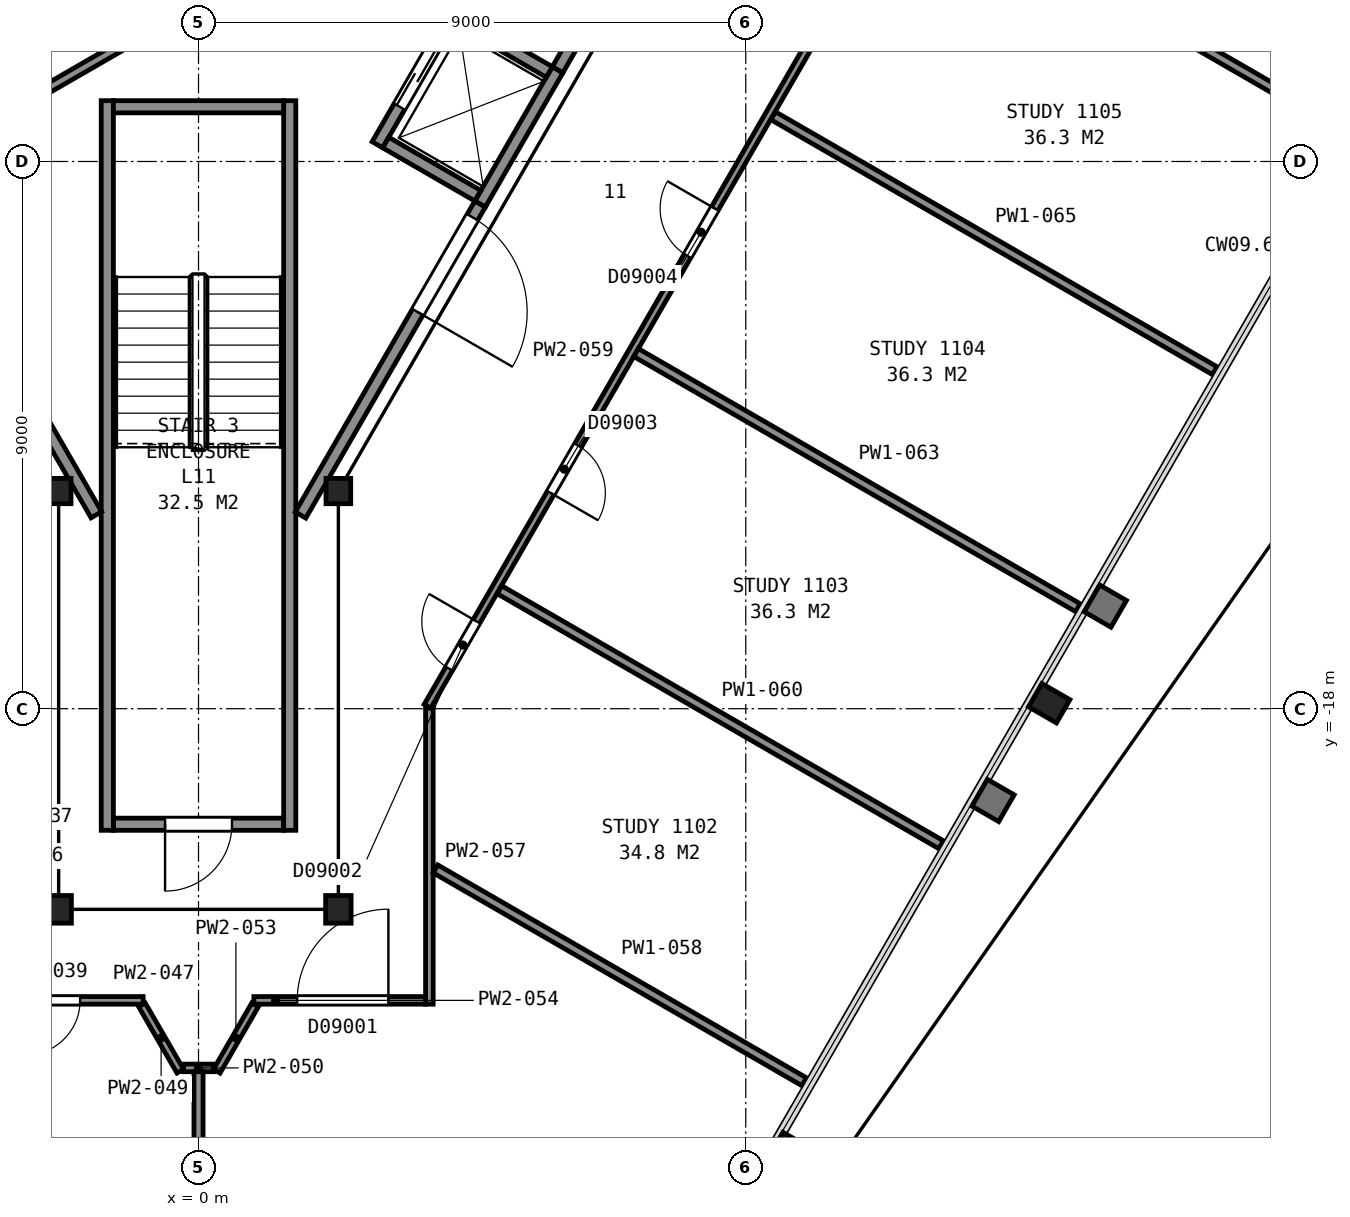
"""IFC4 building model, lengths in metres.
Left out: names, types, materials, properties, quantities, classifications, styles, units other than length and angle.
Written with IfcOpenShell. Run it as: python <this file> out.ifc"""

import sys

from ifc_helpers import new_model, si_unit, direction, frame, frame_2d, origin, origin_2d, place, context, subcontext, project, spatial, rectangle, i_section, extrude, element, fill, save


model = new_model("IFC4")
c1 = context("Model", 3, precision=1e-05, world=origin(), true_north=direction((0.0, 1.0)))
c2 = subcontext(c1, "Body", "Model", "MODEL_VIEW")
j1 = project(units=[si_unit("LENGTHUNIT", "METRE"), si_unit("PLANEANGLEUNIT", "RADIAN")], contexts=[c1])
p1 = place(None, origin())
s1 = spatial("IfcSite", under=j1, at=p1, CompositionType="ELEMENT")
p2 = place(p1, origin())
s2 = spatial("IfcBuilding", under=s1, at=p2, CompositionType="ELEMENT")
p3 = place(p2, frame((0.0, 0.0, 54.8)))
s3 = spatial("IfcBuildingStorey", under=s2, at=p3, CompositionType="ELEMENT", Elevation=54.8)
for number, where, z_axis, x_axis in (
    (1, (9.73, -25.29, 0.0), (0.0, 0.0, 1.0), (-0.5, -0.866, 0.0)),
    (2, (13.99, -17.91, 0.0), (0.0, 0.0, 1.0), (-0.5, -0.866, 0.0)),
):
    element("IfcColumn", number, at=place(p3, frame(where, z_axis=z_axis, x_axis=x_axis)), inside=s3, PredefinedType="COLUMN", context=c2, shape_type="SweptSolid", body=[
        extrude(i_section(OverallWidth=0.442, OverallDepth=0.531, WebThickness=0.066, FlangeThickness=0.106, FilletRadius=0.015, at=origin_2d()), origin(), (0.0, 0.0, 1.0), 3.6),
    ])
p4 = place(p3, frame((-2.3, -14.42, 0.0), z_axis=(0.0, 0.0, 1.0), x_axis=(1.0, 0.0, 0.0)))
e3 = element("IfcColumn", 3, at=p4, inside=s3, PredefinedType="COLUMN", context=c2, shape_type="SweptSolid", body=[
    extrude(i_section(OverallWidth=0.406, OverallDepth=0.417, WebThickness=0.03, FlangeThickness=0.048, FilletRadius=0.015, at=origin_2d()), origin(), (0.0, 0.0, 1.0), 3.6),
])
for number, where, z_axis, x_axis in (
    (4, (-2.3, -21.3, 0.0), (0.0, 0.0, 1.0), (-1.0, 0.0, 0.0)),
    (5, (2.3, -21.3, 0.0), (0.0, 0.0, 1.0), (-1.0, 0.0, 0.0)),
):
    element("IfcColumn", number, at=place(p3, frame(where, z_axis=z_axis, x_axis=x_axis)), inside=s3, PredefinedType="COLUMN", context=c2, shape_type="SweptSolid", body=[
        extrude(i_section(OverallWidth=0.419, OverallDepth=0.455, WebThickness=0.042, FlangeThickness=0.068, FilletRadius=0.015, at=origin_2d()), origin(), (0.0, 0.0, 1.0), 3.6),
    ])
p5 = place(p3, frame((2.3, -14.42, 0.0), z_axis=(0.0, 0.0, 1.0), x_axis=(1.0, 0.0, 0.0)))
e6 = element("IfcColumn", 6, at=p5, inside=s3, PredefinedType="COLUMN", context=c2, shape_type="SweptSolid", body=[
    extrude(i_section(OverallWidth=0.406, OverallDepth=0.417, WebThickness=0.03, FlangeThickness=0.048, FilletRadius=0.015, at=origin_2d()), origin(), (0.0, 0.0, 1.0), 3.6),
])
p6 = place(p3, frame((-1.4, -19.9, 0.0), z_axis=(0.0, 0.0, 1.0), x_axis=(1.0, 0.0, 0.0)))
e7 = element("IfcWall", 7, at=p6, inside=s3, PredefinedType="PARTITIONING", context=c2, shape_type="SweptSolid", body=[
    extrude(rectangle(XDim=2.8, YDim=0.2, at=frame_2d((1.4, 0.0))), origin(), (0.0, 0.0, 1.0), 3.35),
])
p7 = place(p6, frame((0.85, 0.0, 0.0)))
e8 = element("IfcOpeningElement", 8, at=p7, cuts=e7, PredefinedType="OPENING", context=c2, shape_type="SweptSolid", body=[
    extrude(rectangle(XDim=1.1, YDim=2.1, at=frame_2d((0.55, 1.05))), frame((0.0, 0.11, 0.0), z_axis=(0.0, -1.0, 0.0), x_axis=(1.0, 0.0, 0.0)), (0.0, 0.0, 1.0), 0.22),
])
for number, where, z_axis, x_axis in (
    (9, (1.5, -8.0, 0.0), (0.0, 0.0, 1.0), (0.0, -1.0, 0.0)),
    (10, (-1.5, -8.0, 0.0), (0.0, 0.0, 1.0), (0.0, -1.0, 0.0)),
):
    element("IfcWall", number, at=place(p3, frame(where, z_axis=z_axis, x_axis=x_axis)), inside=s3, PredefinedType="PARTITIONING", context=c2, shape_type="SweptSolid", body=[
        extrude(rectangle(XDim=12.0, YDim=0.2, at=frame_2d((6.0, 0.0))), origin(), (0.0, 0.0, 1.0), 3.35),
    ])
p8 = place(p3, frame((-1.4, -8.1, 0.0), z_axis=(0.0, 0.0, 1.0), x_axis=(1.0, 0.0, 0.0)))
e11 = element("IfcWall", 11, at=p8, inside=s3, PredefinedType="PARTITIONING", context=c2, shape_type="SweptSolid", body=[
    extrude(rectangle(XDim=2.8, YDim=0.2, at=frame_2d((1.4, 0.0))), origin(), (0.0, 0.0, 1.0), 3.35),
])
p9 = place(p3, frame((4.63, -9.7, 0.0), z_axis=(0.0, 0.0, 1.0), x_axis=(0.500062241894, 0.865989465428, 0.0)))
e12 = element("IfcWall", 12, at=p9, inside=s3, PredefinedType="PARTITIONING", context=c2, shape_type="SweptSolid", body=[
    extrude(rectangle(XDim=2.55, YDim=0.2, at=frame_2d((1.275, 0.0))), origin(), (0.0, 0.0, 1.0), 3.6),
])
p10 = place(p3, frame((2.942, -8.725, 0.0), z_axis=(0.0, 0.0, 1.0), x_axis=(0.500020783669, 0.866013403995, 0.0)))
e13 = element("IfcWall", 13, at=p10, inside=s3, PredefinedType="PARTITIONING", context=c2, shape_type="SweptSolid", body=[
    extrude(rectangle(XDim=2.55, YDim=0.2, at=frame_2d((1.275, 0.0))), origin(), (0.0, 0.0, 1.0), 3.6),
])
p11 = place(p10, frame((0.725, 0.0, 0.0)))
e14 = element("IfcOpeningElement", 14, at=p11, cuts=e13, PredefinedType="OPENING", context=c2, shape_type="SweptSolid", body=[
    extrude(rectangle(XDim=1.1, YDim=2.1, at=frame_2d((0.55, 1.05))), frame((0.0, 0.11, 0.0), z_axis=(0.0, -1.0, 0.0), x_axis=(1.0, 0.0, 0.0)), (0.0, 0.0, 1.0), 0.22),
])
p12 = place(p3, frame((5.769, -7.528, 0.0), z_axis=(0.0, 0.0, 1.0), x_axis=(-0.866002029911, 0.500040482552, 0.0)))
e15 = element("IfcWall", 15, at=p12, inside=s3, PredefinedType="PARTITIONING", context=c2, shape_type="SweptSolid", body=[
    extrude(rectangle(XDim=1.75, YDim=0.2, at=frame_2d((0.875, 0.0))), origin(), (0.0, 0.0, 1.0), 3.6),
])
p13 = place(p3, frame((4.594, -9.563, 0.0), z_axis=(0.0, 0.0, 1.0), x_axis=(-0.866036909293, 0.499980071345, 0.0)))
e16 = element("IfcWall", 16, at=p13, inside=s3, PredefinedType="PARTITIONING", context=c2, shape_type="SweptSolid", body=[
    extrude(rectangle(XDim=1.75, YDim=0.2, at=frame_2d((0.875, 0.0))), origin(), (0.0, 0.0, 1.0), 3.6),
])
p14 = place(p3, frame((-13.664, 5.946, 0.0), z_axis=(0.0, 0.0, 1.0), x_axis=(0.499994327219, -0.866028678941, 0.0)))
e17 = element("IfcWall", 17, at=p14, inside=s3, PredefinedType="PARTITIONING", context=c2, shape_type="SweptSolid", body=[
    extrude(rectangle(XDim=23.968, YDim=0.2, at=frame_2d((11.984, 0.0))), origin(), (0.0, 0.0, 1.0), 3.35),
])
p15 = place(p3, frame((-4.825, -9.154, 0.0), z_axis=(0.0, 0.0, 1.0), x_axis=(0.866023738697, 0.500002884005, 0.0)))
e18 = element("IfcWall", 18, at=p15, inside=s3, PredefinedType="PARTITIONING", context=c2, shape_type="SweptSolid", body=[
    extrude(rectangle(XDim=4.22, YDim=0.15, at=frame_2d((2.11, 0.0))), origin(), (0.0, 0.0, 1.0), 3.35),
])
p16 = place(p15, frame((1.595, 0.0, 0.0)))
e19 = element("IfcOpeningElement", 19, at=p16, cuts=e18, PredefinedType="OPENING", context=c2, shape_type="SweptSolid", body=[
    extrude(rectangle(XDim=0.9, YDim=2.1, at=frame_2d((0.45, 1.05))), frame((0.0, 0.085, 0.0), z_axis=(0.0, -1.0, 0.0), x_axis=(1.0, 0.0, 0.0)), (0.0, 0.0, 1.0), 0.17),
])
p17 = place(p3, frame((1.677, -14.815, 0.0), z_axis=(0.0, 0.0, 1.0), x_axis=(0.49999445743, 0.866028603765, 0.0)))
e20 = element("IfcWall", 20, at=p17, inside=s3, PredefinedType="PARTITIONING", context=c2, shape_type="SweptSolid", body=[
    extrude(rectangle(XDim=5.905, YDim=0.2, at=frame_2d((2.952, 0.0))), origin(), (0.0, 0.0, 1.0), 3.35),
])
p18 = place(p17, frame((3.855, 0.0, 0.0)))
e21 = element("IfcOpeningElement", 21, at=p18, cuts=e20, PredefinedType="OPENING", context=c2, shape_type="SweptSolid", body=[
    extrude(rectangle(XDim=1.8, YDim=2.1, at=frame_2d((0.9, 1.05))), frame((0.0, 0.11, 0.0), z_axis=(0.0, -1.0, 0.0), x_axis=(1.0, 0.0, 0.0)), (0.0, 0.0, 1.0), 0.22),
])
p19 = place(p3, frame((5.906, -7.49, 0.0), z_axis=(0.0, 0.0, 1.0), x_axis=(0.500252727967, 0.865879442048, 0.0)))
e22 = element("IfcWall", 22, at=p19, inside=s3, PredefinedType="PARTITIONING", context=c2, shape_type="SweptSolid", body=[
    extrude(rectangle(XDim=2.617, YDim=0.2, at=frame_2d((1.309, 0.0))), origin(), (0.0, 0.0, 1.0), 3.35),
])
p20 = place(p3, frame((-0.91, -22.797, 0.0), z_axis=(0.0, 0.0, 1.0), x_axis=(-1.0, 0.0, 0.0)))
e23 = element("IfcWall", 23, at=p20, inside=s3, PredefinedType="PARTITIONING", context=c2, shape_type="SweptSolid", body=[
    extrude(rectangle(XDim=2.822, YDim=0.125, at=frame_2d((1.411, 0.0))), origin(), (0.0, 0.0, 1.0), 2.613),
])
p21 = place(p20, frame((1.037, 0.0, 0.0)))
e24 = element("IfcOpeningElement", 24, at=p21, cuts=e23, PredefinedType="OPENING", context=c2, shape_type="SweptSolid", body=[
    extrude(rectangle(XDim=0.9, YDim=2.1, at=frame_2d((0.45, 1.05))), frame((0.0, 0.073, 0.0), z_axis=(0.0, -1.0, 0.0), x_axis=(1.0, 0.0, 0.0)), (0.0, 0.0, 1.0), 0.145),
])
p22 = place(p3, frame((-0.93, -22.871, 0.0), z_axis=(0.0, 0.0, 1.0), x_axis=(0.500242104966, -0.865885579288, 0.0)))
e25 = element("IfcWall", 25, at=p22, inside=s3, PredefinedType="PARTITIONING", context=c2, shape_type="SweptSolid", body=[
    extrude(rectangle(XDim=1.26, YDim=0.125, at=frame_2d((0.63, 0.0))), origin(), (0.0, 0.0, 1.0), 2.613),
])
p23 = place(p3, frame((-0.246, -23.908, 0.0), z_axis=(0.0, 0.0, 1.0), x_axis=(1.0, 0.0, 0.0)))
e26 = element("IfcWall", 26, at=p23, inside=s3, PredefinedType="PARTITIONING", context=c2, shape_type="SweptSolid", body=[
    extrude(rectangle(XDim=0.492, YDim=0.125, at=frame_2d((0.246, 0.0))), origin(), (0.0, 0.0, 1.0), 2.613),
])
p24 = place(p3, frame((0.0, -32.362, 0.0), z_axis=(0.0, 0.0, 1.0), x_axis=(0.0, 1.0, 0.0)))
e27 = element("IfcWall", 27, at=p24, inside=s3, PredefinedType="PARTITIONING", context=c2, shape_type="SweptSolid", body=[
    extrude(rectangle(XDim=8.392, YDim=0.15, at=frame_2d((4.196, 0.0))), origin(), (0.0, 0.0, 1.0), 2.613),
])
p25 = place(p3, frame((0.3, -23.962, 0.0), z_axis=(0.0, 0.0, 1.0), x_axis=(0.500242104966, 0.865885579288, 0.0)))
e28 = element("IfcWall", 28, at=p25, inside=s3, PredefinedType="PARTITIONING", context=c2, shape_type="SweptSolid", body=[
    extrude(rectangle(XDim=1.26, YDim=0.125, at=frame_2d((0.63, 0.0))), origin(), (0.0, 0.0, 1.0), 2.613),
])
p26 = place(p3, frame((3.732, -22.797, 0.0), z_axis=(0.0, 0.0, 1.0), x_axis=(-1.0, 0.0, 0.0)))
e29 = element("IfcWall", 29, at=p26, inside=s3, PredefinedType="PARTITIONING", context=c2, shape_type="SweptSolid", body=[
    extrude(rectangle(XDim=2.822, YDim=0.125, at=frame_2d((1.411, 0.0))), origin(), (0.0, 0.0, 1.0), 2.613),
])
p27 = place(p26, frame((0.609, 0.0, 0.0)))
e30 = element("IfcOpeningElement", 30, at=p27, cuts=e29, PredefinedType="OPENING", context=c2, shape_type="SweptSolid", body=[
    extrude(rectangle(XDim=1.5, YDim=2.1, at=frame_2d((0.75, 1.05))), frame((0.0, 0.073, 0.0), z_axis=(0.0, -1.0, 0.0), x_axis=(1.0, 0.0, 0.0)), (0.0, 0.0, 1.0), 0.145),
])
p28 = place(p3, frame((3.797, -22.86, 0.0), z_axis=(0.0, 0.0, 1.0), x_axis=(0.0, 1.0, 0.0)))
e31 = element("IfcWall", 31, at=p28, inside=s3, PredefinedType="PARTITIONING", context=c2, shape_type="SweptSolid", body=[
    extrude(rectangle(XDim=4.87, YDim=0.125, at=frame_2d((2.435, 0.0))), origin(), (0.0, 0.0, 1.0), 2.613),
])
p29 = place(p3, frame((3.897, -20.635, 0.0), z_axis=(0.0, 0.0, 1.0), x_axis=(0.866031150847, -0.499990045664, 0.0)))
e32 = element("IfcWall", 32, at=p29, inside=s3, PredefinedType="PARTITIONING", context=c2, shape_type="SweptSolid", body=[
    extrude(rectangle(XDim=7.003, YDim=0.15, at=frame_2d((3.501, 0.0))), origin(), (0.0, 0.0, 1.0), 2.613),
])
p30 = place(p3, frame((17.833, 6.406, 0.0), z_axis=(0.0, 0.0, 1.0), x_axis=(-0.500002884005, -0.866023738697, 0.0)))
e33 = element("IfcWall", 33, at=p30, inside=s3, PredefinedType="PARTITIONING", context=c2, shape_type="SweptSolid", body=[
    extrude(rectangle(XDim=28.135, YDim=0.125, at=frame_2d((14.067, 0.0))), origin(), (0.0, 0.0, 1.0), 2.613),
])
p31 = place(p30, frame((26.522, 0.0, 0.0)))
e34 = element("IfcOpeningElement", 34, at=p31, cuts=e33, PredefinedType="OPENING", context=c2, shape_type="SweptSolid", body=[
    extrude(rectangle(XDim=0.9, YDim=2.1, at=frame_2d((0.45, 1.05))), frame((0.0, 0.073, 0.0), z_axis=(0.0, -1.0, 0.0), x_axis=(1.0, 0.0, 0.0)), (0.0, 0.0, 1.0), 0.145),
])
p32 = place(p30, frame((23.184, 0.0, 0.0)))
e35 = element("IfcOpeningElement", 35, at=p32, cuts=e33, PredefinedType="OPENING", context=c2, shape_type="SweptSolid", body=[
    extrude(rectangle(XDim=0.9, YDim=2.1, at=frame_2d((0.45, 1.05))), frame((0.0, 0.073, 0.0), z_axis=(0.0, -1.0, 0.0), x_axis=(1.0, 0.0, 0.0)), (0.0, 0.0, 1.0), 0.145),
])
p33 = place(p30, frame((18.683, 0.0, 0.0)))
e36 = element("IfcOpeningElement", 36, at=p33, cuts=e33, PredefinedType="OPENING", context=c2, shape_type="SweptSolid", body=[
    extrude(rectangle(XDim=0.9, YDim=2.1, at=frame_2d((0.45, 1.05))), frame((0.0, 0.073, 0.0), z_axis=(0.0, -1.0, 0.0), x_axis=(1.0, 0.0, 0.0)), (0.0, 0.0, 1.0), 0.145),
])
p34 = place(p30, frame((14.182, 0.0, 0.0)))
e37 = element("IfcOpeningElement", 37, at=p34, cuts=e33, PredefinedType="OPENING", context=c2, shape_type="SweptSolid", body=[
    extrude(rectangle(XDim=0.9, YDim=2.1, at=frame_2d((0.45, 1.05))), frame((0.0, 0.073, 0.0), z_axis=(0.0, -1.0, 0.0), x_axis=(1.0, 0.0, 0.0)), (0.0, 0.0, 1.0), 0.145),
])
p35 = place(p30, frame((9.681, 0.0, 0.0)))
e38 = element("IfcOpeningElement", 38, at=p35, cuts=e33, PredefinedType="OPENING", context=c2, shape_type="SweptSolid", body=[
    extrude(rectangle(XDim=0.9, YDim=2.1, at=frame_2d((0.45, 1.05))), frame((0.0, 0.073, 0.0), z_axis=(0.0, -1.0, 0.0), x_axis=(1.0, 0.0, 0.0)), (0.0, 0.0, 1.0), 0.145),
])
p36 = place(p30, frame((5.18, 0.0, 0.0)))
e39 = element("IfcOpeningElement", 39, at=p36, cuts=e33, PredefinedType="OPENING", context=c2, shape_type="SweptSolid", body=[
    extrude(rectangle(XDim=0.9, YDim=2.1, at=frame_2d((0.45, 1.05))), frame((0.0, 0.073, 0.0), z_axis=(0.0, -1.0, 0.0), x_axis=(1.0, 0.0, 0.0)), (0.0, 0.0, 1.0), 0.145),
])
p37 = place(p30, frame((1.278, 0.0, 0.0)))
e40 = element("IfcOpeningElement", 40, at=p37, cuts=e33, PredefinedType="OPENING", context=c2, shape_type="SweptSolid", body=[
    extrude(rectangle(XDim=0.9, YDim=2.1, at=frame_2d((0.45, 1.05))), frame((0.0, 0.073, 0.0), z_axis=(0.0, -1.0, 0.0), x_axis=(1.0, 0.0, 0.0)), (0.0, 0.0, 1.0), 0.145),
])
p38 = place(p3, frame((4.949, -16.044, 0.0), z_axis=(0.0, 0.0, 1.0), x_axis=(0.866040157966, -0.499974444137, 0.0)))
e41 = element("IfcWall", 41, at=p38, inside=s3, PredefinedType="PARTITIONING", context=c2, shape_type="SweptSolid", body=[
    extrude(rectangle(XDim=8.387, YDim=0.15, at=frame_2d((4.193, 0.0))), origin(), (0.0, 0.0, 1.0), 2.613),
])
p39 = place(p3, frame((7.196, -12.143, 0.0), z_axis=(0.0, 0.0, 1.0), x_axis=(0.866010672798, -0.500025513949, 0.0)))
e42 = element("IfcWall", 42, at=p39, inside=s3, PredefinedType="PARTITIONING", context=c2, shape_type="SweptSolid", body=[
    extrude(rectangle(XDim=8.391, YDim=0.15, at=frame_2d((4.196, 0.0))), origin(), (0.0, 0.0, 1.0), 2.613),
])
p40 = place(p3, frame((9.45, -8.248, 0.0), z_axis=(0.0, 0.0, 1.0), x_axis=(0.866040157966, -0.499974444137, 0.0)))
e43 = element("IfcWall", 43, at=p40, inside=s3, PredefinedType="PARTITIONING", context=c2, shape_type="SweptSolid", body=[
    extrude(rectangle(XDim=8.387, YDim=0.15, at=frame_2d((4.193, 0.0))), origin(), (0.0, 0.0, 1.0), 2.613),
])
p41 = place(p3, frame((11.697, -4.347, 0.0), z_axis=(0.0, 0.0, 1.0), x_axis=(0.866005348532, -0.500034735108, 0.0)))
e44 = element("IfcWall", 44, at=p41, inside=s3, PredefinedType="PARTITIONING", context=c2, shape_type="SweptSolid", body=[
    extrude(rectangle(XDim=8.392, YDim=0.15, at=frame_2d((4.196, 0.0))), origin(), (0.0, 0.0, 1.0), 2.613),
])
p42 = place(p7, origin())
e45 = element("IfcDoor", 45, at=p42, inside=s3, OperationType="SINGLE_SWING_LEFT", PredefinedType="DOOR", context=c2, shape_type="SweptSolid", body=[
    extrude(rectangle(XDim=1.1, YDim=2.1, at=frame_2d((0.55, 1.05))), frame((0.0, 0.025, 0.0), z_axis=(0.0, -1.0, 0.0), x_axis=(1.0, 0.0, 0.0)), (0.0, 0.0, 1.0), 0.05),
])
fill(e8, e45)
p43 = place(p11, origin())
e46 = element("IfcDoor", 46, at=p43, inside=s3, OperationType="SLIDING_TO_RIGHT", PredefinedType="DOOR", context=c2, shape_type="SweptSolid", body=[
    extrude(rectangle(XDim=1.1, YDim=2.1, at=frame_2d((0.55, 1.05))), frame((0.0, 0.025, 0.0), z_axis=(0.0, -1.0, 0.0), x_axis=(1.0, 0.0, 0.0)), (0.0, 0.0, 1.0), 0.05),
])
fill(e14, e46)
p44 = place(p18, origin())
e47 = element("IfcDoor", 47, at=p44, inside=s3, OperationType="DOUBLE_DOOR_SINGLE_SWING", PredefinedType="DOOR", context=c2, shape_type="SweptSolid", body=[
    extrude(rectangle(XDim=1.8, YDim=2.1, at=frame_2d((0.9, 1.05))), frame((0.0, 0.025, 0.0), z_axis=(0.0, -1.0, 0.0), x_axis=(1.0, 0.0, 0.0)), (0.0, 0.0, 1.0), 0.05),
])
fill(e21, e47)
p45 = place(p21, origin())
e48 = element("IfcDoor", 48, at=p45, inside=s3, OperationType="SINGLE_SWING_RIGHT", PredefinedType="DOOR", context=c2, shape_type="SweptSolid", body=[
    extrude(rectangle(XDim=0.9, YDim=2.1, at=frame_2d((0.45, 1.05))), frame((0.0, 0.025, 0.0), z_axis=(0.0, -1.0, 0.0), x_axis=(1.0, 0.0, 0.0)), (0.0, 0.0, 1.0), 0.05),
])
fill(e24, e48)
p46 = place(p27, origin())
e49 = element("IfcDoor", 49, at=p46, inside=s3, OperationType="DOUBLE_DOOR_SINGLE_SWING", PredefinedType="DOOR", context=c2, shape_type="SweptSolid", body=[
    extrude(rectangle(XDim=1.5, YDim=2.1, at=frame_2d((0.75, 1.05))), frame((0.0, 0.025, 0.0), z_axis=(0.0, -1.0, 0.0), x_axis=(1.0, 0.0, 0.0)), (0.0, 0.0, 1.0), 0.05),
])
fill(e30, e49)
p47 = place(p31, origin())
e50 = element("IfcDoor", 50, at=p47, inside=s3, OperationType="SINGLE_SWING_LEFT", PredefinedType="DOOR", context=c2, shape_type="SweptSolid", body=[
    extrude(rectangle(XDim=0.9, YDim=2.1, at=frame_2d((0.45, 1.05))), frame((0.0, 0.025, 0.0), z_axis=(0.0, -1.0, 0.0), x_axis=(1.0, 0.0, 0.0)), (0.0, 0.0, 1.0), 0.05),
])
fill(e34, e50)
p48 = place(p32, origin())
e51 = element("IfcDoor", 51, at=p48, inside=s3, OperationType="SINGLE_SWING_RIGHT", PredefinedType="DOOR", context=c2, shape_type="SweptSolid", body=[
    extrude(rectangle(XDim=0.9, YDim=2.1, at=frame_2d((0.45, 1.05))), frame((0.0, 0.025, 0.0), z_axis=(0.0, -1.0, 0.0), x_axis=(1.0, 0.0, 0.0)), (0.0, 0.0, 1.0), 0.05),
])
fill(e35, e51)
p49 = place(p33, origin())
e52 = element("IfcDoor", 52, at=p49, inside=s3, OperationType="SINGLE_SWING_LEFT", PredefinedType="DOOR", context=c2, shape_type="SweptSolid", body=[
    extrude(rectangle(XDim=0.9, YDim=2.1, at=frame_2d((0.45, 1.05))), frame((0.0, 0.025, 0.0), z_axis=(0.0, -1.0, 0.0), x_axis=(1.0, 0.0, 0.0)), (0.0, 0.0, 1.0), 0.05),
])
fill(e36, e52)
save(model, sys.argv[1])
